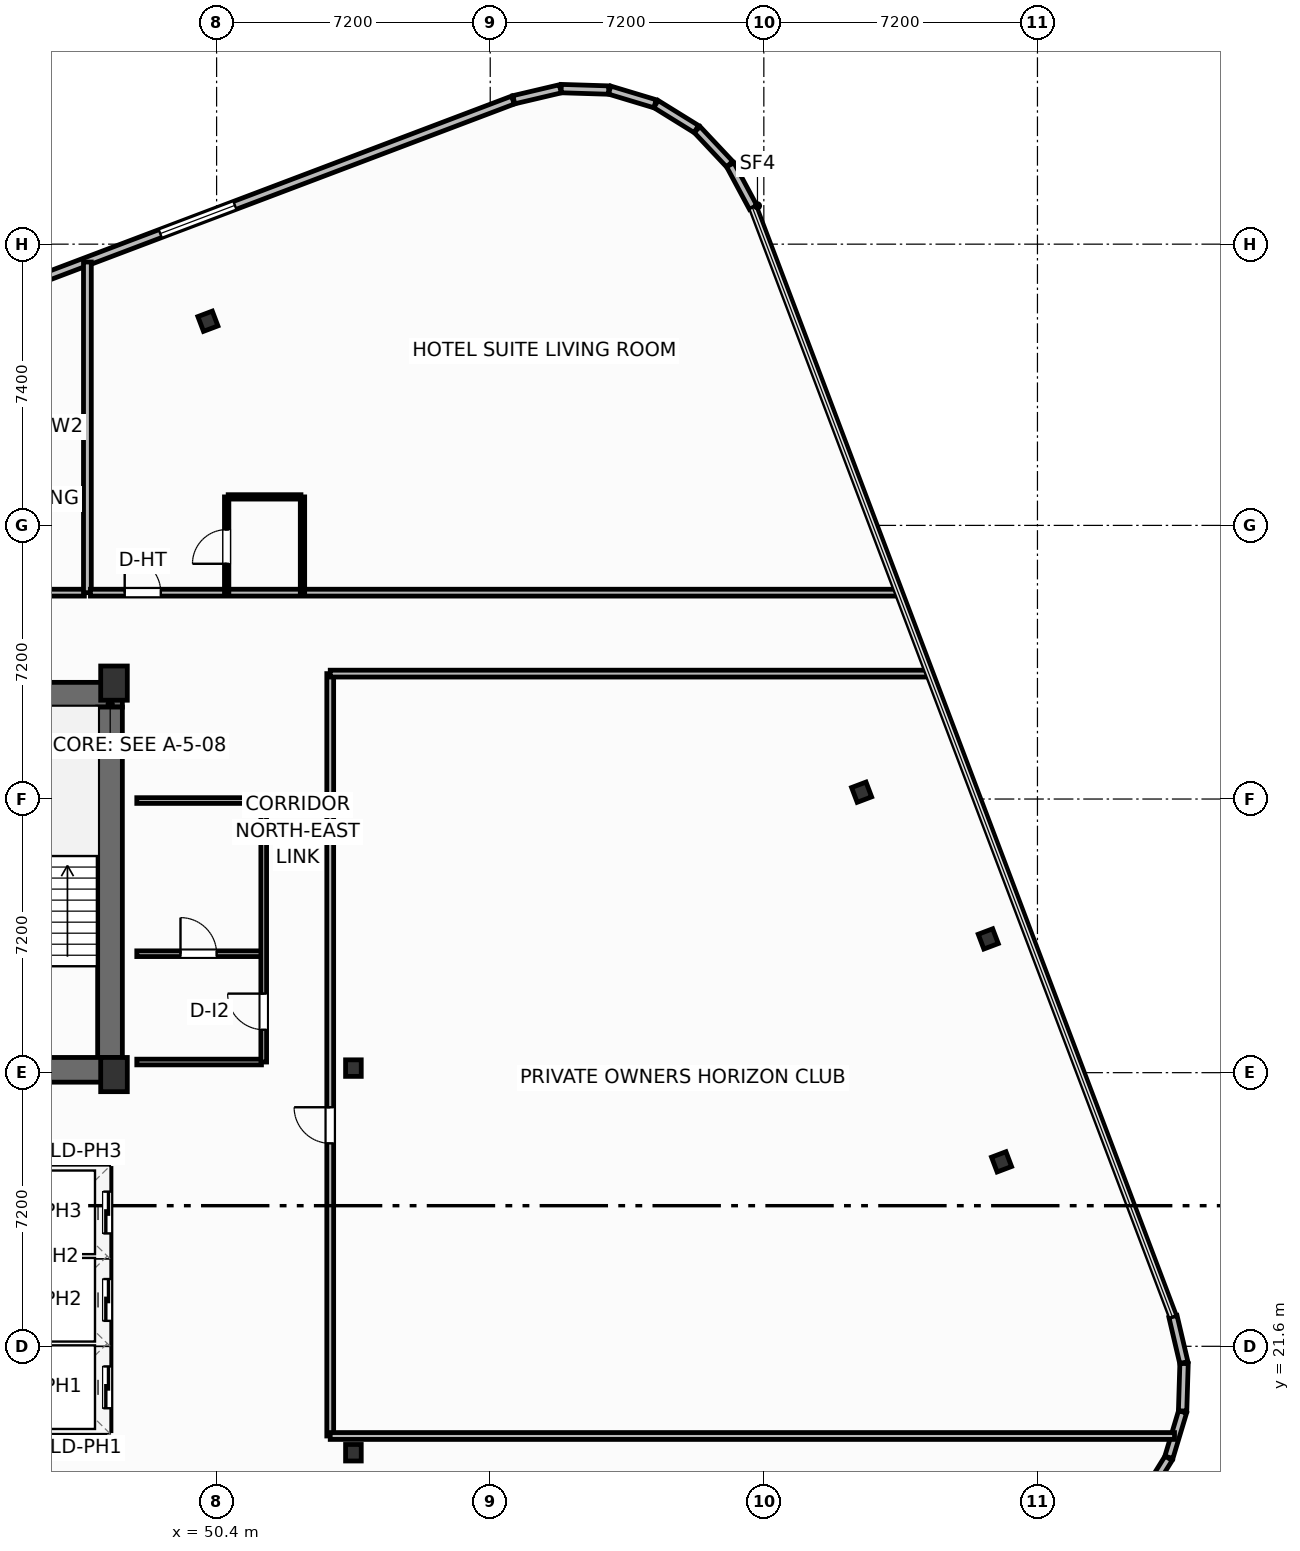
"""IFC4 building model, lengths in metres.
Left out: names, types, materials, properties, quantities, classifications, styles, units other than length and angle.
Written with IfcOpenShell. Run it as: python <this file> out.ifc"""

import sys

from ifc_helpers import new_model, si_unit, direction, frame, frame_2d, origin, origin_2d, place, context, subcontext, project, spatial, rectangle, i_section, extrude, element, fill, save


model = new_model("IFC4")
c1 = context("Model", 3, precision=1e-05, world=origin(), true_north=direction((0.0, 1.0)))
c2 = subcontext(c1, "Body", "Model", "MODEL_VIEW")
j1 = project(units=[si_unit("LENGTHUNIT", "METRE"), si_unit("PLANEANGLEUNIT", "RADIAN")], contexts=[c1])
p1 = place(None, origin())
s1 = spatial("IfcSite", under=j1, at=p1, CompositionType="ELEMENT")
p2 = place(p1, origin())
s2 = spatial("IfcBuilding", under=s1, at=p2, CompositionType="ELEMENT")
p3 = place(p2, frame((0.0, 0.0, 220.1)))
s3 = spatial("IfcBuildingStorey", under=s2, at=p3, CompositionType="ELEMENT", Elevation=220.1)
for number, where, z_axis, x_axis in (
    (1, (47.7, 28.75, 0.0), (0.0, 0.0, 1.0), (1.0, 0.0, 0.0)),
    (2, (47.7, 39.05, 0.0), (0.0, 0.0, 1.0), (1.0, 0.0, 0.0)),
):
    element("IfcColumn", number, at=place(p3, frame(where, z_axis=z_axis, x_axis=x_axis)), inside=s3, PredefinedType="COLUMN", context=c2, shape_type="SweptSolid", body=[
        extrude(rectangle(XDim=0.7, YDim=0.9, at=origin_2d()), origin(), (0.0, 0.0, 1.0), 3.7),
    ])
for number, where, z_axis, x_axis in (
    (3, (54.0, 18.8, 0.0), (0.0, 0.0, 1.0), (1.0, 0.0, 0.0)),
    (4, (54.0, 28.92, 0.0), (0.0, 0.0, 1.0), (1.0, 0.0, 0.0)),
):
    element("IfcColumn", number, at=place(p3, frame(where, z_axis=z_axis, x_axis=x_axis)), inside=s3, PredefinedType="COLUMN", context=c2, shape_type="SweptSolid", body=[
        extrude(i_section(OverallWidth=0.412, OverallDepth=0.435, WebThickness=0.036, FlangeThickness=0.057, FilletRadius=0.025, at=origin_2d()), origin(), (0.0, 0.0, 1.0), 3.7),
    ])
p4 = place(p3, frame((30.48, 38.745, 0.0), z_axis=(0.0, 0.0, 1.0), x_axis=(1.0, 0.0, 0.0)))
e5 = element("IfcWall", 5, at=p4, inside=s3, PredefinedType="SHEAR", context=c2, shape_type="SweptSolid", body=[
    extrude(rectangle(XDim=17.44, YDim=0.65, at=frame_2d((8.72, 0.0))), origin(), (0.0, 0.0, 1.0), 3.45),
])
p5 = place(p3, frame((47.595, 29.2, 0.0), z_axis=(0.0, 0.0, 1.0), x_axis=(0.0, 1.0, 0.0)))
e6 = element("IfcWall", 6, at=p5, inside=s3, PredefinedType="SHEAR", context=c2, shape_type="SweptSolid", body=[
    extrude(rectangle(XDim=9.22, YDim=0.65, at=frame_2d((4.61, 0.0))), origin(), (0.0, 0.0, 1.0), 3.45),
])
p6 = place(p3, frame((43.6, 28.875, 0.0), z_axis=(0.0, 0.0, 1.0), x_axis=(1.0, 0.0, 0.0)))
e7 = element("IfcWall", 7, at=p6, inside=s3, PredefinedType="SHEAR", context=c2, shape_type="SweptSolid", body=[
    extrude(rectangle(XDim=4.32, YDim=0.65, at=frame_2d((2.16, 0.0))), origin(), (0.0, 0.0, 1.0), 3.45),
])
for number, where, z_axis, x_axis in (
    (8, (71.055, 26.453, 0.0), (0.0, 0.0, 1.0), (0.935, 0.354, 0.0)),
    (9, (70.706, 32.32, 0.0), (0.0, 0.0, 1.0), (0.935, 0.354, 0.0)),
    (10, (67.373, 36.18, 0.0), (0.0, 0.0, 1.0), (0.935, 0.354, 0.0)),
    (11, (50.171, 48.572, 0.0), (0.0, 0.0, 1.0), (0.935, 0.354, 0.0)),
):
    element("IfcColumn", number, at=place(p3, frame(where, z_axis=z_axis, x_axis=x_axis)), inside=s3, PredefinedType="COLUMN", context=c2, shape_type="SweptSolid", body=[
        extrude(i_section(OverallWidth=0.406, OverallDepth=0.416, WebThickness=0.03, FlangeThickness=0.048, FilletRadius=0.025, at=origin_2d()), origin(), (0.0, 0.0, 1.0), 3.7),
    ])
for number, where, z_axis, x_axis in (
    (12, (74.794, 17.593, 0.0), (0.0, 0.0, 1.0), (0.527, 0.85, 0.0)),
    (13, (75.458, 18.679, 0.0), (0.0, 0.0, 1.0), (0.288, 0.958, 0.0)),
):
    element("IfcWall", number, at=place(p3, frame(where, z_axis=z_axis, x_axis=x_axis)), inside=s3, PredefinedType="SOLIDWALL", context=c2, shape_type="SweptSolid", body=[
        extrude(rectangle(XDim=1.249, YDim=0.22, at=frame_2d((0.624, 0.0))), origin(), (0.0, 0.0, 1.0), 2.73),
    ])
p7 = place(p3, frame((75.819, 19.899, 0.0), z_axis=(0.0, 0.0, 1.0), x_axis=(0.030898954628, 0.999522513305, 0.0)))
e14 = element("IfcWall", 14, at=p7, inside=s3, PredefinedType="SOLIDWALL", context=c2, shape_type="SweptSolid", body=[
    extrude(rectangle(XDim=1.248, YDim=0.22, at=frame_2d((0.624, 0.0))), origin(), (0.0, 0.0, 1.0), 2.73),
])
p8 = place(p3, frame((75.852, 21.172, 0.0), z_axis=(0.0, 0.0, 1.0), x_axis=(-0.228941257463, 0.973440239887, 0.0)))
e15 = element("IfcWall", 15, at=p8, inside=s3, PredefinedType="SOLIDWALL", context=c2, shape_type="SweptSolid", body=[
    extrude(rectangle(XDim=1.249, YDim=0.22, at=frame_2d((0.625, 0.0))), origin(), (0.0, 0.0, 1.0), 2.73),
])
p9 = place(p3, frame((64.519, 51.566, 0.0), z_axis=(0.0, 0.0, 1.0), x_axis=(-0.473093575122, 0.881012184466, 0.0)))
e16 = element("IfcWall", 16, at=p9, inside=s3, PredefinedType="SOLIDWALL", context=c2, shape_type="SweptSolid", body=[
    extrude(rectangle(XDim=1.274, YDim=0.22, at=frame_2d((0.637, 0.0))), origin(), (0.0, 0.0, 1.0), 2.73),
])
for number, where, z_axis, x_axis in (
    (17, (63.899, 52.706, 0.0), (0.0, 0.0, 1.0), (-0.685, 0.729, 0.0)),
    (18, (63.023, 53.629, 0.0), (0.0, 0.0, 1.0), (-0.85, 0.526, 0.0)),
):
    element("IfcWall", number, at=place(p3, frame(where, z_axis=z_axis, x_axis=x_axis)), inside=s3, PredefinedType="SOLIDWALL", context=c2, shape_type="SweptSolid", body=[
        extrude(rectangle(XDim=1.249, YDim=0.22, at=frame_2d((0.625, 0.0))), origin(), (0.0, 0.0, 1.0), 2.73),
    ])
for number, where, z_axis, x_axis in (
    (19, (61.937, 54.294, 0.0), (0.0, 0.0, 1.0), (-0.958, 0.288, 0.0)),
    (20, (60.717, 54.655, 0.0), (0.0, 0.0, 1.0), (-1.0, 0.031, 0.0)),
):
    element("IfcWall", number, at=place(p3, frame(where, z_axis=z_axis, x_axis=x_axis)), inside=s3, PredefinedType="SOLIDWALL", context=c2, shape_type="SweptSolid", body=[
        extrude(rectangle(XDim=1.249, YDim=0.22, at=frame_2d((0.624, 0.0))), origin(), (0.0, 0.0, 1.0), 2.73),
    ])
p10 = place(p3, frame((59.444, 54.688, 0.0), z_axis=(0.0, 0.0, 1.0), x_axis=(-0.973409523464, -0.229071821989, 0.0)))
e21 = element("IfcWall", 21, at=p10, inside=s3, PredefinedType="SOLIDWALL", context=c2, shape_type="SweptSolid", body=[
    extrude(rectangle(XDim=1.257, YDim=0.22, at=frame_2d((0.628, 0.0))), origin(), (0.0, 0.0, 1.0), 2.73),
])
p11 = place(p3, frame((58.198, 54.391, 0.0), z_axis=(0.0, 0.0, 1.0), x_axis=(-0.935223849772, -0.354056988094, 0.0)))
e22 = element("IfcWall", 22, at=p11, inside=s3, PredefinedType="SOLIDWALL", context=c2, shape_type="SweptSolid", body=[
    extrude(rectangle(XDim=17.747, YDim=0.22, at=frame_2d((8.874, 0.0))), origin(), (0.0, 0.0, 1.0), 2.73),
])
p12 = place(p11, frame((7.823, 0.0, 0.8)))
e23 = element("IfcOpeningElement", 23, at=p12, cuts=e22, PredefinedType="OPENING", context=c2, shape_type="SweptSolid", body=[
    extrude(rectangle(XDim=2.1, YDim=1.75, at=frame_2d((1.05, 0.875))), frame((0.0, 0.12, 0.0), z_axis=(0.0, -1.0, 0.0), x_axis=(1.0, 0.0, 0.0)), (0.0, 0.0, 1.0), 0.24),
])
p13 = place(p3, frame((35.58, 41.43, 0.0), z_axis=(0.0, 0.0, 1.0), x_axis=(1.0, 0.0, 0.0)))
e24 = element("IfcWall", 24, at=p13, inside=s3, PredefinedType="PARTITIONING", context=c2, shape_type="SweptSolid", body=[
    extrude(rectangle(XDim=11.34, YDim=0.18, at=frame_2d((5.67, 0.0))), origin(), (0.0, 0.0, 1.0), 3.018),
])
p14 = place(p13, frame((3.313, 0.0, 0.0)))
e25 = element("IfcOpeningElement", 25, at=p14, cuts=e24, PredefinedType="OPENING", context=c2, shape_type="SweptSolid", body=[
    extrude(rectangle(XDim=0.95, YDim=2.15, at=frame_2d((0.475, 1.075))), frame((0.0, 0.1, 0.0), z_axis=(0.0, -1.0, 0.0), x_axis=(1.0, 0.0, 0.0)), (0.0, 0.0, 1.0), 0.2),
])
p15 = place(p3, frame((47.0, 41.43, 0.0), z_axis=(0.0, 0.0, 1.0), x_axis=(0.0, 1.0, 0.0)))
e26 = element("IfcWall", 26, at=p15, inside=s3, PredefinedType="PARTITIONING", context=c2, shape_type="SweptSolid", body=[
    extrude(rectangle(XDim=8.7, YDim=0.205, at=frame_2d((4.35, 0.0))), origin(), (0.0, 0.0, 1.0), 3.45),
])
p16 = place(p3, frame((47.08, 41.43, 0.0), z_axis=(0.0, 0.0, 1.0), x_axis=(1.0, 0.0, 0.0)))
e27 = element("IfcWall", 27, at=p16, inside=s3, PredefinedType="PARTITIONING", context=c2, shape_type="SweptSolid", body=[
    extrude(rectangle(XDim=21.216, YDim=0.18, at=frame_2d((10.608, 0.0))), origin(), (0.0, 0.0, 1.0), 3.45),
])
p17 = place(p16, frame((0.902, 0.0, 0.0)))
e28 = element("IfcOpeningElement", 28, at=p17, cuts=e27, PredefinedType="OPENING", context=c2, shape_type="SweptSolid", body=[
    extrude(rectangle(XDim=0.95, YDim=2.15, at=frame_2d((0.475, 1.075))), frame((0.0, 0.1, 0.0), z_axis=(0.0, -1.0, 0.0), x_axis=(1.0, 0.0, 0.0)), (0.0, 0.0, 1.0), 0.2),
])
p18 = place(p3, frame((50.705, 43.95, 0.0), z_axis=(0.0, 0.0, 1.0), x_axis=(1.0, 0.0, 0.0)))
e29 = element("IfcWall", 29, at=p18, inside=s3, PredefinedType="PARTITIONING", context=c2, shape_type="SweptSolid", body=[
    extrude(rectangle(XDim=1.915, YDim=0.115, at=frame_2d((0.958, 0.0))), origin(), (0.0, 0.0, 1.0), 3.45),
])
p19 = place(p3, frame((50.665, 41.43, 0.0), z_axis=(0.0, 0.0, 1.0), x_axis=(0.0, 1.0, 0.0)))
e30 = element("IfcWall", 30, at=p19, inside=s3, PredefinedType="PARTITIONING", context=c2, shape_type="SweptSolid", body=[
    extrude(rectangle(XDim=2.52, YDim=0.115, at=frame_2d((1.26, 0.0))), origin(), (0.0, 0.0, 1.0), 3.45),
])
p20 = place(p19, frame((0.76, 0.0, 0.0)))
e31 = element("IfcOpeningElement", 31, at=p20, cuts=e30, PredefinedType="OPENING", context=c2, shape_type="SweptSolid", body=[
    extrude(rectangle(XDim=0.9, YDim=2.05, at=frame_2d((0.45, 1.025))), frame((0.0, 0.067, 0.0), z_axis=(0.0, -1.0, 0.0), x_axis=(1.0, 0.0, 0.0)), (0.0, 0.0, 1.0), 0.135),
])
p21 = place(p3, frame((52.66, 41.43, 0.0), z_axis=(0.0, 0.0, 1.0), x_axis=(0.0, 1.0, 0.0)))
e32 = element("IfcWall", 32, at=p21, inside=s3, PredefinedType="PARTITIONING", context=c2, shape_type="SweptSolid", body=[
    extrude(rectangle(XDim=2.52, YDim=0.115, at=frame_2d((1.26, 0.0))), origin(), (0.0, 0.0, 1.0), 3.45),
])
p22 = place(p3, frame((53.39, 19.24, 0.0), z_axis=(0.0, 0.0, 1.0), x_axis=(0.0, 1.0, 0.0)))
e33 = element("IfcWall", 33, at=p22, inside=s3, PredefinedType="PARTITIONING", context=c2, shape_type="SweptSolid", body=[
    extrude(rectangle(XDim=20.06, YDim=0.18, at=frame_2d((10.03, 0.0))), origin(), (0.0, 0.0, 1.0), 3.45),
])
p23 = place(p22, frame((7.7, 0.0, 0.0)))
e34 = element("IfcOpeningElement", 34, at=p23, cuts=e33, PredefinedType="OPENING", context=c2, shape_type="SweptSolid", body=[
    extrude(rectangle(XDim=0.95, YDim=2.05, at=frame_2d((0.475, 1.025))), frame((0.0, 0.1, 0.0), z_axis=(0.0, -1.0, 0.0), x_axis=(1.0, 0.0, 0.0)), (0.0, 0.0, 1.0), 0.2),
])
p24 = place(p3, frame((53.39, 19.24, 0.0), z_axis=(0.0, 0.0, 1.0), x_axis=(1.0, 0.0, 0.0)))
e35 = element("IfcWall", 35, at=p24, inside=s3, PredefinedType="PARTITIONING", context=c2, shape_type="SweptSolid", body=[
    extrude(rectangle(XDim=22.217, YDim=0.18, at=frame_2d((11.108, 0.0))), origin(), (0.0, 0.0, 1.0), 3.45),
])
p25 = place(p3, frame((53.39, 39.3, 0.0), z_axis=(0.0, 0.0, 1.0), x_axis=(1.0, 0.0, 0.0)))
e36 = element("IfcWall", 36, at=p25, inside=s3, PredefinedType="PARTITIONING", context=c2, shape_type="SweptSolid", body=[
    extrude(rectangle(XDim=15.713, YDim=0.18, at=frame_2d((7.856, 0.0))), origin(), (0.0, 0.0, 1.0), 3.45),
])
p26 = place(p3, frame((48.3, 31.93, 0.0), z_axis=(0.0, 0.0, 1.0), x_axis=(1.0, 0.0, 0.0)))
e37 = element("IfcWall", 37, at=p26, inside=s3, PredefinedType="PARTITIONING", context=c2, shape_type="SweptSolid", body=[
    extrude(rectangle(XDim=3.28, YDim=0.15, at=frame_2d((1.64, 0.0))), origin(), (0.0, 0.0, 1.0), 3.45),
])
p27 = place(p26, frame((1.15, 0.0, 0.0)))
e38 = element("IfcOpeningElement", 38, at=p27, cuts=e37, PredefinedType="OPENING", context=c2, shape_type="SweptSolid", body=[
    extrude(rectangle(XDim=0.95, YDim=2.05, at=frame_2d((0.475, 1.025))), frame((0.0, 0.085, 0.0), z_axis=(0.0, -1.0, 0.0), x_axis=(1.0, 0.0, 0.0)), (0.0, 0.0, 1.0), 0.17),
])
p28 = place(p3, frame((48.3, 29.08, 0.0), z_axis=(0.0, 0.0, 1.0), x_axis=(1.0, 0.0, 0.0)))
e39 = element("IfcWall", 39, at=p28, inside=s3, PredefinedType="PARTITIONING", context=c2, shape_type="SweptSolid", body=[
    extrude(rectangle(XDim=3.28, YDim=0.15, at=frame_2d((1.64, 0.0))), origin(), (0.0, 0.0, 1.0), 2.662),
])
p29 = place(p3, frame((48.3, 35.96, 0.0), z_axis=(0.0, 0.0, 1.0), x_axis=(1.0, 0.0, 0.0)))
e40 = element("IfcWall", 40, at=p29, inside=s3, PredefinedType="PARTITIONING", context=c2, shape_type="SweptSolid", body=[
    extrude(rectangle(XDim=3.28, YDim=0.15, at=frame_2d((1.64, 0.0))), origin(), (0.0, 0.0, 1.0), 3.45),
])
p30 = place(p3, frame((51.64, 29.08, 0.0), z_axis=(0.0, 0.0, 1.0), x_axis=(0.0, 1.0, 0.0)))
e41 = element("IfcWall", 41, at=p30, inside=s3, PredefinedType="PARTITIONING", context=c2, shape_type="SweptSolid", body=[
    extrude(rectangle(XDim=6.88, YDim=0.15, at=frame_2d((3.44, 0.0))), origin(), (0.0, 0.0, 1.0), 3.45),
])
p31 = place(p30, frame((0.85, 0.0, 0.0)))
e42 = element("IfcOpeningElement", 42, at=p31, cuts=e41, PredefinedType="OPENING", context=c2, shape_type="SweptSolid", body=[
    extrude(rectangle(XDim=0.95, YDim=2.05, at=frame_2d((0.475, 1.025))), frame((0.0, 0.085, 0.0), z_axis=(0.0, -1.0, 0.0), x_axis=(1.0, 0.0, 0.0)), (0.0, 0.0, 1.0), 0.17),
])
for number, where, z_axis, x_axis in (
    (43, (45.24, 21.675, 0.0), (0.0, 0.0, 1.0), (1.0, 0.0, 0.0)),
    (44, (45.24, 23.975, 0.0), (0.0, 0.0, 1.0), (1.0, 0.0, 0.0)),
):
    element("IfcWall", number, at=place(p3, frame(where, z_axis=z_axis, x_axis=x_axis)), inside=s3, PredefinedType="PARTITIONING", context=c2, shape_type="SweptSolid", body=[
        extrude(rectangle(XDim=2.22, YDim=0.2, at=frame_2d((1.11, 0.0))), origin(), (0.0, 0.0, 1.0), 3.45),
    ])
p32 = place(p3, frame((45.24, 19.38, 0.0), z_axis=(0.0, 0.0, 1.0), x_axis=(1.0, 0.0, 0.0)))
e45 = element("IfcWall", 45, at=p32, inside=s3, PredefinedType="PARTITIONING", context=c2, shape_type="SweptSolid", body=[
    extrude(rectangle(XDim=2.22, YDim=0.2, at=frame_2d((1.11, 0.0))), origin(), (0.0, 0.0, 1.0), 2.662),
])
p33 = place(p3, frame((45.24, 26.28, 0.0), z_axis=(0.0, 0.0, 1.0), x_axis=(1.0, 0.0, 0.0)))
e46 = element("IfcWall", 46, at=p33, inside=s3, PredefinedType="PARTITIONING", context=c2, shape_type="SweptSolid", body=[
    extrude(rectangle(XDim=2.22, YDim=0.2, at=frame_2d((1.11, 0.0))), origin(), (0.0, 0.0, 1.0), 3.45),
])
p34 = place(p3, frame((47.52, 19.38, 0.0), z_axis=(0.0, 0.0, 1.0), x_axis=(0.0, 1.0, 0.0)))
e47 = element("IfcWall", 47, at=p34, inside=s3, PredefinedType="PARTITIONING", context=c2, shape_type="SweptSolid", body=[
    extrude(rectangle(XDim=6.9, YDim=0.2, at=frame_2d((3.45, 0.0))), origin(), (0.0, 0.0, 1.0), 3.45),
])
p35 = place(p34, frame((0.59, 0.0, 0.0)))
e48 = element("IfcOpeningElement", 48, at=p35, cuts=e47, PredefinedType="OPENING", context=c2, shape_type="SweptSolid", body=[
    extrude(rectangle(XDim=1.1, YDim=2.15, at=frame_2d((0.55, 1.075))), frame((0.0, 0.11, 0.0), z_axis=(0.0, -1.0, 0.0), x_axis=(1.0, 0.0, 0.0)), (0.0, 0.0, 1.0), 0.22),
])
p36 = place(p34, frame((2.89, 0.0, 0.0)))
e49 = element("IfcOpeningElement", 49, at=p36, cuts=e47, PredefinedType="OPENING", context=c2, shape_type="SweptSolid", body=[
    extrude(rectangle(XDim=1.1, YDim=2.15, at=frame_2d((0.55, 1.075))), frame((0.0, 0.11, 0.0), z_axis=(0.0, -1.0, 0.0), x_axis=(1.0, 0.0, 0.0)), (0.0, 0.0, 1.0), 0.22),
])
p37 = place(p34, frame((5.19, 0.0, 0.0)))
e50 = element("IfcOpeningElement", 50, at=p37, cuts=e47, PredefinedType="OPENING", context=c2, shape_type="SweptSolid", body=[
    extrude(rectangle(XDim=1.1, YDim=2.15, at=frame_2d((0.55, 1.075))), frame((0.0, 0.11, 0.0), z_axis=(0.0, -1.0, 0.0), x_axis=(1.0, 0.0, 0.0)), (0.0, 0.0, 1.0), 0.22),
])
p38 = place(p12, origin())
e51 = element("IfcWindow", 51, at=p38, inside=s3, PartitioningType="SINGLE_PANEL", PredefinedType="WINDOW", context=c2, shape_type="SweptSolid", body=[
    extrude(rectangle(XDim=2.1, YDim=1.75, at=frame_2d((1.05, 0.875))), frame((0.0, 0.03, 0.0), z_axis=(0.0, -1.0, 0.0), x_axis=(1.0, 0.0, 0.0)), (0.0, 0.0, 1.0), 0.06),
])
fill(e23, e51)
p39 = place(p17, origin())
e52 = element("IfcDoor", 52, at=p39, inside=s3, OperationType="SINGLE_SWING_LEFT", PredefinedType="DOOR", context=c2, shape_type="SweptSolid", body=[
    extrude(rectangle(XDim=0.95, YDim=2.15, at=frame_2d((0.475, 1.075))), frame((0.0, 0.025, 0.0), z_axis=(0.0, -1.0, 0.0), x_axis=(1.0, 0.0, 0.0)), (0.0, 0.0, 1.0), 0.05),
])
fill(e28, e52)
p40 = place(p20, origin())
e53 = element("IfcDoor", 53, at=p40, inside=s3, OperationType="SINGLE_SWING_LEFT", PredefinedType="DOOR", context=c2, shape_type="SweptSolid", body=[
    extrude(rectangle(XDim=0.9, YDim=2.05, at=frame_2d((0.45, 1.025))), frame((0.0, 0.025, 0.0), z_axis=(0.0, -1.0, 0.0), x_axis=(1.0, 0.0, 0.0)), (0.0, 0.0, 1.0), 0.05),
])
fill(e31, e53)
p41 = place(p23, origin())
e54 = element("IfcDoor", 54, at=p41, inside=s3, OperationType="SINGLE_SWING_RIGHT", PredefinedType="DOOR", context=c2, shape_type="SweptSolid", body=[
    extrude(rectangle(XDim=0.95, YDim=2.05, at=frame_2d((0.475, 1.025))), frame((0.0, 0.025, 0.0), z_axis=(0.0, -1.0, 0.0), x_axis=(1.0, 0.0, 0.0)), (0.0, 0.0, 1.0), 0.05),
])
fill(e34, e54)
p42 = place(p27, origin())
e55 = element("IfcDoor", 55, at=p42, inside=s3, OperationType="SINGLE_SWING_LEFT", PredefinedType="DOOR", context=c2, shape_type="SweptSolid", body=[
    extrude(rectangle(XDim=0.95, YDim=2.05, at=frame_2d((0.475, 1.025))), frame((0.0, 0.025, 0.0), z_axis=(0.0, -1.0, 0.0), x_axis=(1.0, 0.0, 0.0)), (0.0, 0.0, 1.0), 0.05),
])
fill(e38, e55)
p43 = place(p31, origin())
e56 = element("IfcDoor", 56, at=p43, inside=s3, OperationType="SINGLE_SWING_RIGHT", PredefinedType="DOOR", context=c2, shape_type="SweptSolid", body=[
    extrude(rectangle(XDim=0.95, YDim=2.05, at=frame_2d((0.475, 1.025))), frame((0.0, 0.025, 0.0), z_axis=(0.0, -1.0, 0.0), x_axis=(1.0, 0.0, 0.0)), (0.0, 0.0, 1.0), 0.05),
])
fill(e42, e56)
p44 = place(p35, origin())
e57 = element("IfcDoor", 57, at=p44, inside=s3, OperationType="SLIDING_TO_LEFT", PredefinedType="DOOR", context=c2, shape_type="SweptSolid", body=[
    extrude(rectangle(XDim=1.1, YDim=2.15, at=frame_2d((0.55, 1.075))), frame((0.0, 0.025, 0.0), z_axis=(0.0, -1.0, 0.0), x_axis=(1.0, 0.0, 0.0)), (0.0, 0.0, 1.0), 0.05),
])
fill(e48, e57)
p45 = place(p36, origin())
e58 = element("IfcDoor", 58, at=p45, inside=s3, OperationType="SLIDING_TO_LEFT", PredefinedType="DOOR", context=c2, shape_type="SweptSolid", body=[
    extrude(rectangle(XDim=1.1, YDim=2.15, at=frame_2d((0.55, 1.075))), frame((0.0, 0.025, 0.0), z_axis=(0.0, -1.0, 0.0), x_axis=(1.0, 0.0, 0.0)), (0.0, 0.0, 1.0), 0.05),
])
fill(e49, e58)
p46 = place(p37, origin())
e59 = element("IfcDoor", 59, at=p46, inside=s3, OperationType="SLIDING_TO_LEFT", PredefinedType="DOOR", context=c2, shape_type="SweptSolid", body=[
    extrude(rectangle(XDim=1.1, YDim=2.15, at=frame_2d((0.55, 1.075))), frame((0.0, 0.025, 0.0), z_axis=(0.0, -1.0, 0.0), x_axis=(1.0, 0.0, 0.0)), (0.0, 0.0, 1.0), 0.05),
])
fill(e50, e59)
save(model, sys.argv[1])
